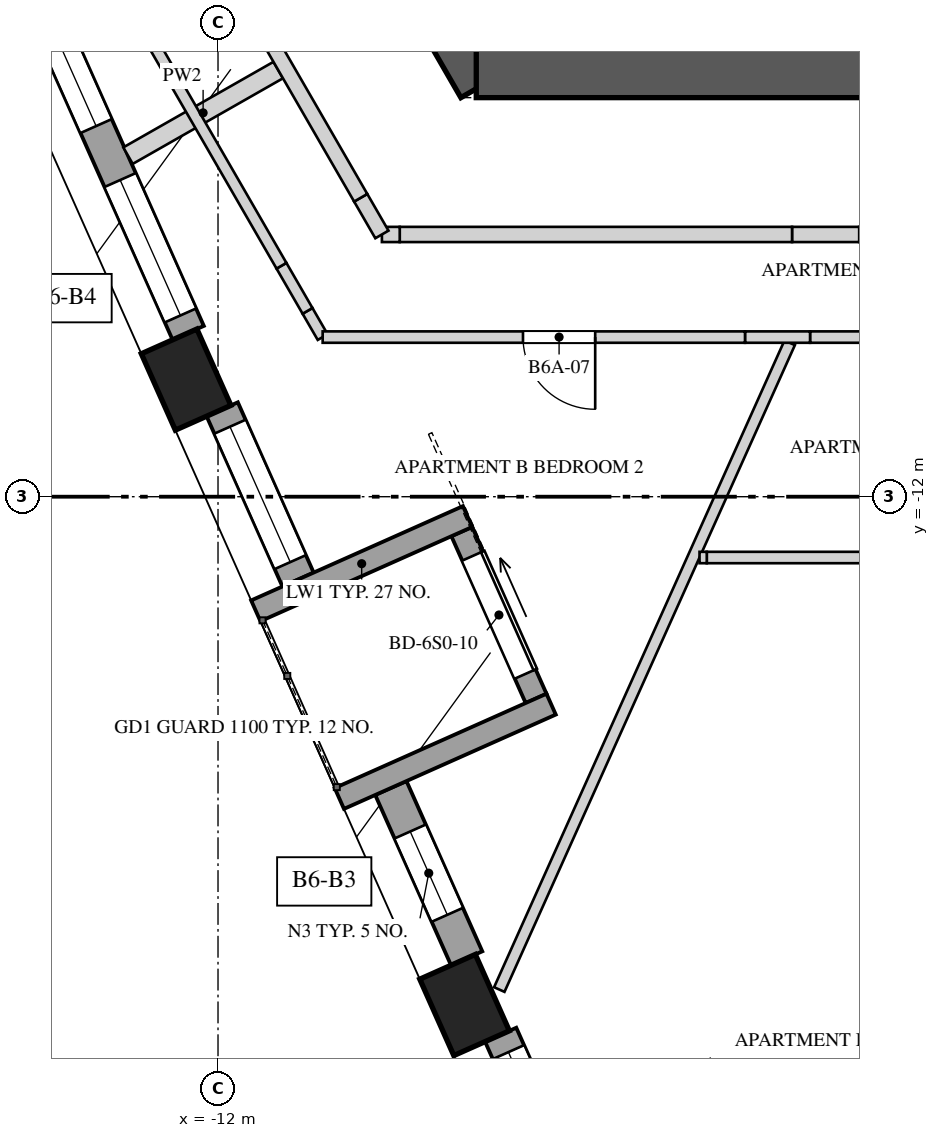
"""IFC4 building model, lengths in metres.
Left out: names, types, materials, properties, quantities, classifications, styles, units other than length and angle.
Written with IfcOpenShell. Run it as: python <this file> out.ifc"""

import sys

from ifc_helpers import new_model, si_unit, direction, frame, frame_2d, origin, origin_2d, place, context, subcontext, project, spatial, rectangle, extrude, element, fill, save


model = new_model("IFC4")
c1 = context("Model", 3, precision=1e-05, world=origin(), true_north=direction((0.0, 1.0)))
c2 = subcontext(c1, "Body", "Model", "MODEL_VIEW")
j1 = project(units=[si_unit("LENGTHUNIT", "METRE"), si_unit("PLANEANGLEUNIT", "RADIAN")], contexts=[c1])
p1 = place(None, origin())
s1 = spatial("IfcSite", under=j1, at=p1, CompositionType="ELEMENT")
p2 = place(p1, origin())
s2 = spatial("IfcBuilding", under=s1, at=p2, CompositionType="ELEMENT")
p3 = place(p2, frame((0.0, 0.0, 241.2)))
s3 = spatial("IfcBuildingStorey", under=s2, at=p3, CompositionType="ELEMENT", Elevation=241.2)
p4 = place(p3, frame((-9.945, -4.075, 0.0), z_axis=(0.0, 0.0, 1.0), x_axis=(0.499995765644, -0.866027848477, 0.0)))
e1 = element("IfcWall", 1, at=p4, inside=s3, PredefinedType="SHEAR", context=c2, shape_type="SweptSolid", body=[
    extrude(rectangle(XDim=2.887, YDim=0.7, at=frame_2d((1.443, 0.0))), origin(), (0.0, 0.0, 1.0), 4.0),
])
p5 = place(p3, frame((-8.603, -6.4, 0.0), z_axis=(0.0, 0.0, 1.0), x_axis=(1.0, 0.0, 0.0)))
e2 = element("IfcWall", 2, at=p5, inside=s3, PredefinedType="SHEAR", context=c2, shape_type="SweptSolid", body=[
    extrude(rectangle(XDim=17.205, YDim=0.7, at=frame_2d((8.603, 0.0))), origin(), (0.0, 0.0, 1.0), 4.0),
])
p6 = place(p5, frame((6.808, 0.0, 0.0)))
e3 = element("IfcOpeningElement", 3, at=p6, cuts=e2, PredefinedType="OPENING", context=c2, shape_type="SweptSolid", body=[
    extrude(rectangle(XDim=1.0, YDim=2.4, at=frame_2d((0.5, 1.2))), frame((0.0, 0.36, 0.0), z_axis=(0.0, -1.0, 0.0), x_axis=(1.0, 0.0, 0.0)), (0.0, 0.0, 1.0), 0.72),
])
p7 = place(p5, frame((14.922, 0.0, 0.0)))
e4 = element("IfcOpeningElement", 4, at=p7, cuts=e2, PredefinedType="OPENING", context=c2, shape_type="SweptSolid", body=[
    extrude(rectangle(XDim=0.8, YDim=2.1, at=frame_2d((0.4, 1.05))), frame((0.0, 0.36, 0.0), z_axis=(0.0, -1.0, 0.0), x_axis=(1.0, 0.0, 0.0)), (0.0, 0.0, 1.0), 0.72),
])
for number, where, z_axis, x_axis in (
    (5, (-12.42, -10.459, 0.0), (0.0, 0.0, 1.0), (0.407, -0.914, 0.0)),
    (6, (-8.756, -18.687, 0.0), (0.0, 0.0, 1.0), (0.407, -0.914, 0.0)),
):
    element("IfcColumn", number, at=place(p3, frame(where, z_axis=z_axis, x_axis=x_axis)), inside=s3, PredefinedType="COLUMN", context=c2, shape_type="SweptSolid", body=[
        extrude(rectangle(XDim=1.1, YDim=0.8, at=origin_2d()), origin(), (0.0, 0.0, 1.0), 4.0),
    ])
p8 = place(p3, frame((-15.608, -2.622, 0.0), z_axis=(0.0, 0.0, 1.0), x_axis=(0.406748602972, -0.91354013266, 0.0)))
e7 = element("IfcWall", 7, at=p8, inside=s3, PredefinedType="SOLIDWALL", context=c2, shape_type="SweptSolid", body=[
    extrude(rectangle(XDim=7.907, YDim=0.45, at=frame_2d((3.953, 0.0))), origin(), (0.0, 0.0, 1.0), 3.3),
])
p9 = place(p8, frame((0.251, 0.0, 0.4)))
e8 = element("IfcOpeningElement", 8, at=p9, cuts=e7, PredefinedType="OPENING", context=c2, shape_type="SweptSolid", body=[
    extrude(rectangle(XDim=1.95, YDim=2.75, at=frame_2d((0.975, 1.375))), frame((0.0, 0.235, 0.0), z_axis=(0.0, -1.0, 0.0), x_axis=(1.0, 0.0, 0.0)), (0.0, 0.0, 1.0), 0.47),
])
p10 = place(p8, frame((2.978, 0.0, 0.4)))
e9 = element("IfcOpeningElement", 9, at=p10, cuts=e7, PredefinedType="OPENING", context=c2, shape_type="SweptSolid", body=[
    extrude(rectangle(XDim=1.95, YDim=2.75, at=frame_2d((0.975, 1.375))), frame((0.0, 0.235, 0.0), z_axis=(0.0, -1.0, 0.0), x_axis=(1.0, 0.0, 0.0)), (0.0, 0.0, 1.0), 0.47),
])
p11 = place(p8, frame((5.706, 0.0, 0.4)))
e10 = element("IfcOpeningElement", 10, at=p11, cuts=e7, PredefinedType="OPENING", context=c2, shape_type="SweptSolid", body=[
    extrude(rectangle(XDim=1.95, YDim=2.75, at=frame_2d((0.975, 1.375))), frame((0.0, 0.235, 0.0), z_axis=(0.0, -1.0, 0.0), x_axis=(1.0, 0.0, 0.0)), (0.0, 0.0, 1.0), 0.47),
])
p12 = place(p3, frame((-11.945, -10.85, 0.0), z_axis=(0.0, 0.0, 1.0), x_axis=(0.406784963852, -0.913523942316, 0.0)))
e11 = element("IfcWall", 11, at=p12, inside=s3, PredefinedType="SOLIDWALL", context=c2, shape_type="SweptSolid", body=[
    extrude(rectangle(XDim=2.452, YDim=0.45, at=frame_2d((1.226, 0.0))), origin(), (0.0, 0.0, 1.0), 3.3),
])
p13 = place(p12, frame((0.251, 0.0, 0.4)))
e12 = element("IfcOpeningElement", 12, at=p13, cuts=e11, PredefinedType="OPENING", context=c2, shape_type="SweptSolid", body=[
    extrude(rectangle(XDim=1.95, YDim=2.75, at=frame_2d((0.975, 1.375))), frame((0.0, 0.235, 0.0), z_axis=(0.0, -1.0, 0.0), x_axis=(1.0, 0.0, 0.0)), (0.0, 0.0, 1.0), 0.47),
])
p14 = place(p3, frame((-9.726, -15.833, 0.0), z_axis=(0.0, 0.0, 1.0), x_axis=(0.406701876909, -0.913560935745, 0.0)))
e13 = element("IfcWall", 13, at=p14, inside=s3, PredefinedType="SOLIDWALL", context=c2, shape_type="SweptSolid", body=[
    extrude(rectangle(XDim=2.452, YDim=0.45, at=frame_2d((1.226, 0.0))), origin(), (0.0, 0.0, 1.0), 3.3),
])
p15 = place(p14, frame((0.626, 0.0, 0.4)))
e14 = element("IfcOpeningElement", 14, at=p15, cuts=e13, PredefinedType="OPENING", context=c2, shape_type="SweptSolid", body=[
    extrude(rectangle(XDim=1.2, YDim=2.75, at=frame_2d((0.6, 1.375))), frame((0.0, 0.235, 0.0), z_axis=(0.0, -1.0, 0.0), x_axis=(1.0, 0.0, 0.0)), (0.0, 0.0, 1.0), 0.47),
])
p16 = place(p3, frame((-8.281, -19.078, 0.0), z_axis=(0.0, 0.0, 1.0), x_axis=(0.406701876909, -0.913560935745, 0.0)))
e15 = element("IfcWall", 15, at=p16, inside=s3, PredefinedType="SOLIDWALL", context=c2, shape_type="SweptSolid", body=[
    extrude(rectangle(XDim=2.452, YDim=0.45, at=frame_2d((1.226, 0.0))), origin(), (0.0, 0.0, 1.0), 3.3),
])
p17 = place(p16, frame((0.251, 0.0, 0.4)))
e16 = element("IfcOpeningElement", 16, at=p17, cuts=e15, PredefinedType="OPENING", context=c2, shape_type="SweptSolid", body=[
    extrude(rectangle(XDim=1.95, YDim=2.75, at=frame_2d((0.975, 1.375))), frame((0.0, 0.235, 0.0), z_axis=(0.0, -1.0, 0.0), x_axis=(1.0, 0.0, 0.0)), (0.0, 0.0, 1.0), 0.47),
])
p18 = place(p3, frame((-8.793, -12.459, 0.0), z_axis=(0.0, 0.0, 1.0), x_axis=(0.406723017018, -0.913551524232, 0.0)))
e17 = element("IfcWall", 17, at=p18, inside=s3, PredefinedType="SOLIDWALL", context=c2, shape_type="SweptSolid", body=[
    extrude(rectangle(XDim=2.402, YDim=0.3, at=frame_2d((1.201, 0.0))), origin(), (0.0, 0.0, 1.0), 3.3),
])
p19 = place(p18, frame((0.351, 0.0, 0.0)))
e18 = element("IfcOpeningElement", 18, at=p19, cuts=e17, PredefinedType="OPENING", context=c2, shape_type="SweptSolid", body=[
    extrude(rectangle(XDim=1.7, YDim=2.5, at=frame_2d((0.85, 1.25))), frame((0.0, 0.16, 0.0), z_axis=(0.0, -1.0, 0.0), x_axis=(1.0, 0.0, 0.0)), (0.0, 0.0, 1.0), 0.32),
])
for number, where, z_axis, x_axis in (
    (19, (-11.503, -13.501, 0.0), (0.0, 0.0, 1.0), (0.914, 0.407, 0.0)),
    (20, (-10.404, -15.97, 0.0), (0.0, 0.0, 1.0), (0.914, 0.407, 0.0)),
):
    element("IfcWall", number, at=place(p3, frame(where, z_axis=z_axis, x_axis=x_axis)), inside=s3, PredefinedType="SOLIDWALL", context=c2, shape_type="SweptSolid", body=[
        extrude(rectangle(XDim=3.05, YDim=0.3, at=frame_2d((1.525, 0.0))), origin(), (0.0, 0.0, 1.0), 3.3),
    ])
p20 = place(p3, frame((-11.208, -6.387, 0.0), z_axis=(0.0, 0.0, 1.0), x_axis=(-0.868850228445, -0.495075025153, 0.0)))
e21 = element("IfcWall", 21, at=p20, inside=s3, PredefinedType="SOLIDWALL", context=c2, shape_type="SweptSolid", body=[
    extrude(rectangle(XDim=2.274, YDim=0.25, at=frame_2d((1.137, 0.0))), origin(), (0.0, 0.0, 1.0), 3.65),
])
p21 = place(p3, frame((-10.623, -9.9, 0.0), z_axis=(0.0, 0.0, 1.0), x_axis=(-0.499899443193, 0.866083452501, 0.0)))
e22 = element("IfcWall", 22, at=p21, inside=s3, PredefinedType="PARTITIONING", context=c2, shape_type="SweptSolid", body=[
    extrude(rectangle(XDim=0.398, YDim=0.15, at=frame_2d((0.199, 0.0))), origin(), (0.0, 0.0, 1.0), 3.65),
])
p22 = place(p3, frame((-10.822, -9.555, 0.0), z_axis=(0.0, 0.0, 1.0), x_axis=(-0.499969057507, 0.866043267704, 0.0)))
e23 = element("IfcWall", 23, at=p22, inside=s3, PredefinedType="PARTITIONING", context=c2, shape_type="SweptSolid", body=[
    extrude(rectangle(XDim=0.686, YDim=0.15, at=frame_2d((0.343, 0.0))), origin(), (0.0, 0.0, 1.0), 2.95),
])
p23 = place(p3, frame((-11.165, -8.961, 0.0), z_axis=(0.0, 0.0, 1.0), x_axis=(-0.500009912158, 0.866019680922, 0.0)))
e24 = element("IfcWall", 24, at=p23, inside=s3, PredefinedType="PARTITIONING", context=c2, shape_type="SweptSolid", body=[
    extrude(rectangle(XDim=5.44, YDim=0.15, at=frame_2d((2.72, 0.0))), origin(), (0.0, 0.0, 1.0), 3.65),
])
p24 = place(p3, frame((-8.3, -18.484, 0.0), z_axis=(0.0, 0.0, 1.0), x_axis=(0.409625524412, 0.9122537639, 0.0)))
e25 = element("IfcWall", 25, at=p24, inside=s3, PredefinedType="PARTITIONING", context=c2, shape_type="SweptSolid", body=[
    extrude(rectangle(XDim=9.327, YDim=0.15, at=frame_2d((4.664, 0.0))), origin(), (0.0, 0.0, 1.0), 2.75),
])
p25 = place(p3, frame((-3.244, -9.9, 0.0), z_axis=(0.0, 0.0, 1.0), x_axis=(-1.0, 0.0, 0.0)))
e26 = element("IfcWall", 26, at=p25, inside=s3, PredefinedType="PARTITIONING", context=c2, shape_type="SweptSolid", body=[
    extrude(rectangle(XDim=0.967, YDim=0.15, at=frame_2d((0.484, 0.0))), origin(), (0.0, 0.0, 1.0), 3.65),
])
p26 = place(p3, frame((-4.211, -9.9, 0.0), z_axis=(0.0, 0.0, 1.0), x_axis=(-1.0, 0.0, 0.0)))
e27 = element("IfcWall", 27, at=p26, inside=s3, PredefinedType="PARTITIONING", context=c2, shape_type="SweptSolid", body=[
    extrude(rectangle(XDim=0.856, YDim=0.15, at=frame_2d((0.428, 0.0))), origin(), (0.0, 0.0, 1.0), 2.75),
])
p27 = place(p3, frame((-5.067, -9.9, 0.0), z_axis=(0.0, 0.0, 1.0), x_axis=(-1.0, 0.0, 0.0)))
e28 = element("IfcWall", 28, at=p27, inside=s3, PredefinedType="PARTITIONING", context=c2, shape_type="SweptSolid", body=[
    extrude(rectangle(XDim=5.556, YDim=0.15, at=frame_2d((2.778, 0.0))), origin(), (0.0, 0.0, 1.0), 3.65),
])
p28 = place(p27, frame((1.971, 0.0, 0.0)))
e29 = element("IfcOpeningElement", 29, at=p28, cuts=e28, PredefinedType="OPENING", context=c2, shape_type="SweptSolid", body=[
    extrude(rectangle(XDim=0.95, YDim=2.4, at=frame_2d((0.475, 1.2))), frame((0.0, 0.085, 0.0), z_axis=(0.0, -1.0, 0.0), x_axis=(1.0, 0.0, 0.0)), (0.0, 0.0, 1.0), 0.17),
])
p29 = place(p3, frame((-2.956, -12.8, 0.0), z_axis=(0.0, 0.0, 1.0), x_axis=(-1.0, 0.0, 0.0)))
e30 = element("IfcWall", 30, at=p29, inside=s3, PredefinedType="PARTITIONING", context=c2, shape_type="SweptSolid", body=[
    extrude(rectangle(XDim=2.614, YDim=0.15, at=frame_2d((1.307, 0.0))), origin(), (0.0, 0.0, 1.0), 3.65),
])
p30 = place(p3, frame((-5.57, -12.8, 0.0), z_axis=(0.0, 0.0, 1.0), x_axis=(-1.0, 0.0, 0.0)))
e31 = element("IfcWall", 31, at=p30, inside=s3, PredefinedType="PARTITIONING", context=c2, shape_type="SweptSolid", body=[
    extrude(rectangle(XDim=0.095, YDim=0.15, at=frame_2d((0.048, 0.0))), origin(), (0.0, 0.0, 1.0), 2.75),
])
p31 = place(p3, frame((-2.135, -8.55, 0.0), z_axis=(0.0, 0.0, 1.0), x_axis=(-1.0, 0.0, 0.0)))
e32 = element("IfcWall", 32, at=p31, inside=s3, PredefinedType="SOLIDWALL", context=c2, shape_type="SweptSolid", body=[
    extrude(rectangle(XDim=1.43, YDim=0.2, at=frame_2d((0.715, 0.0))), origin(), (0.0, 0.0, 1.0), 3.65),
])
p32 = place(p3, frame((-3.565, -8.55, 0.0), z_axis=(0.0, 0.0, 1.0), x_axis=(-1.0, 0.0, 0.0)))
e33 = element("IfcWall", 33, at=p32, inside=s3, PredefinedType="SOLIDWALL", context=c2, shape_type="SweptSolid", body=[
    extrude(rectangle(XDim=0.883, YDim=0.2, at=frame_2d((0.442, 0.0))), origin(), (0.0, 0.0, 1.0), 2.75),
])
p33 = place(p3, frame((-4.448, -8.55, 0.0), z_axis=(0.0, 0.0, 1.0), x_axis=(-1.0, 0.0, 0.0)))
e34 = element("IfcWall", 34, at=p33, inside=s3, PredefinedType="SOLIDWALL", context=c2, shape_type="SweptSolid", body=[
    extrude(rectangle(XDim=5.161, YDim=0.2, at=frame_2d((2.581, 0.0))), origin(), (0.0, 0.0, 1.0), 3.65),
])
p34 = place(p3, frame((-9.609, -8.55, 0.0), z_axis=(0.0, 0.0, 1.0), x_axis=(-1.0, 0.0, 0.0)))
e35 = element("IfcWall", 35, at=p34, inside=s3, PredefinedType="SOLIDWALL", context=c2, shape_type="SweptSolid", body=[
    extrude(rectangle(XDim=0.234, YDim=0.2, at=frame_2d((0.117, 0.0))), origin(), (0.0, 0.0, 1.0), 2.95),
])
p35 = place(p3, frame((-9.844, -8.55, 0.0), z_axis=(0.0, 0.0, 1.0), x_axis=(-0.500000383388, 0.866025182435, 0.0)))
e36 = element("IfcWall", 36, at=p35, inside=s3, PredefinedType="SOLIDWALL", context=c2, shape_type="SweptSolid", body=[
    extrude(rectangle(XDim=0.558, YDim=0.2, at=frame_2d((0.279, 0.0))), origin(), (0.0, 0.0, 1.0), 2.95),
])
p36 = place(p3, frame((-10.123, -8.067, 0.0), z_axis=(0.0, 0.0, 1.0), x_axis=(-0.500005339912, 0.866022320763, 0.0)))
e37 = element("IfcWall", 37, at=p36, inside=s3, PredefinedType="SOLIDWALL", context=c2, shape_type="SweptSolid", body=[
    extrude(rectangle(XDim=4.408, YDim=0.2, at=frame_2d((2.204, 0.0))), origin(), (0.0, 0.0, 1.0), 3.65),
])
p37 = place(p10, origin())
e38 = element("IfcWindow", 38, at=p37, inside=s3, PartitioningType="SINGLE_PANEL", PredefinedType="WINDOW", context=c2, shape_type="SweptSolid", body=[
    extrude(rectangle(XDim=1.95, YDim=2.75, at=frame_2d((0.975, 1.375))), frame((0.0, 0.03, 0.0), z_axis=(0.0, -1.0, 0.0), x_axis=(1.0, 0.0, 0.0)), (0.0, 0.0, 1.0), 0.06),
])
fill(e9, e38)
p38 = place(p11, origin())
e39 = element("IfcWindow", 39, at=p38, inside=s3, PartitioningType="SINGLE_PANEL", PredefinedType="WINDOW", context=c2, shape_type="SweptSolid", body=[
    extrude(rectangle(XDim=1.95, YDim=2.75, at=frame_2d((0.975, 1.375))), frame((0.0, 0.03, 0.0), z_axis=(0.0, -1.0, 0.0), x_axis=(1.0, 0.0, 0.0)), (0.0, 0.0, 1.0), 0.06),
])
fill(e10, e39)
p39 = place(p13, origin())
e40 = element("IfcWindow", 40, at=p39, inside=s3, PartitioningType="SINGLE_PANEL", PredefinedType="WINDOW", context=c2, shape_type="SweptSolid", body=[
    extrude(rectangle(XDim=1.95, YDim=2.75, at=frame_2d((0.975, 1.375))), frame((0.0, 0.03, 0.0), z_axis=(0.0, -1.0, 0.0), x_axis=(1.0, 0.0, 0.0)), (0.0, 0.0, 1.0), 0.06),
])
fill(e12, e40)
p40 = place(p15, origin())
e41 = element("IfcWindow", 41, at=p40, inside=s3, PartitioningType="SINGLE_PANEL", PredefinedType="WINDOW", context=c2, shape_type="SweptSolid", body=[
    extrude(rectangle(XDim=1.2, YDim=2.75, at=frame_2d((0.6, 1.375))), frame((0.0, 0.03, 0.0), z_axis=(0.0, -1.0, 0.0), x_axis=(1.0, 0.0, 0.0)), (0.0, 0.0, 1.0), 0.06),
])
fill(e14, e41)
p41 = place(p17, origin())
e42 = element("IfcWindow", 42, at=p41, inside=s3, PartitioningType="SINGLE_PANEL", PredefinedType="WINDOW", context=c2, shape_type="SweptSolid", body=[
    extrude(rectangle(XDim=1.95, YDim=2.75, at=frame_2d((0.975, 1.375))), frame((0.0, 0.03, 0.0), z_axis=(0.0, -1.0, 0.0), x_axis=(1.0, 0.0, 0.0)), (0.0, 0.0, 1.0), 0.06),
])
fill(e16, e42)
p42 = place(p19, origin())
e43 = element("IfcDoor", 43, at=p42, inside=s3, OperationType="SLIDING_TO_LEFT", PredefinedType="DOOR", context=c2, shape_type="SweptSolid", body=[
    extrude(rectangle(XDim=1.7, YDim=2.5, at=frame_2d((0.85, 1.25))), frame((0.0, 0.025, 0.0), z_axis=(0.0, -1.0, 0.0), x_axis=(1.0, 0.0, 0.0)), (0.0, 0.0, 1.0), 0.05),
])
fill(e18, e43)
p43 = place(p28, origin())
e44 = element("IfcDoor", 44, at=p43, inside=s3, OperationType="SINGLE_SWING_LEFT", PredefinedType="DOOR", context=c2, shape_type="SweptSolid", body=[
    extrude(rectangle(XDim=0.95, YDim=2.4, at=frame_2d((0.475, 1.2))), frame((0.0, 0.025, 0.0), z_axis=(0.0, -1.0, 0.0), x_axis=(1.0, 0.0, 0.0)), (0.0, 0.0, 1.0), 0.05),
])
fill(e29, e44)
save(model, sys.argv[1])
